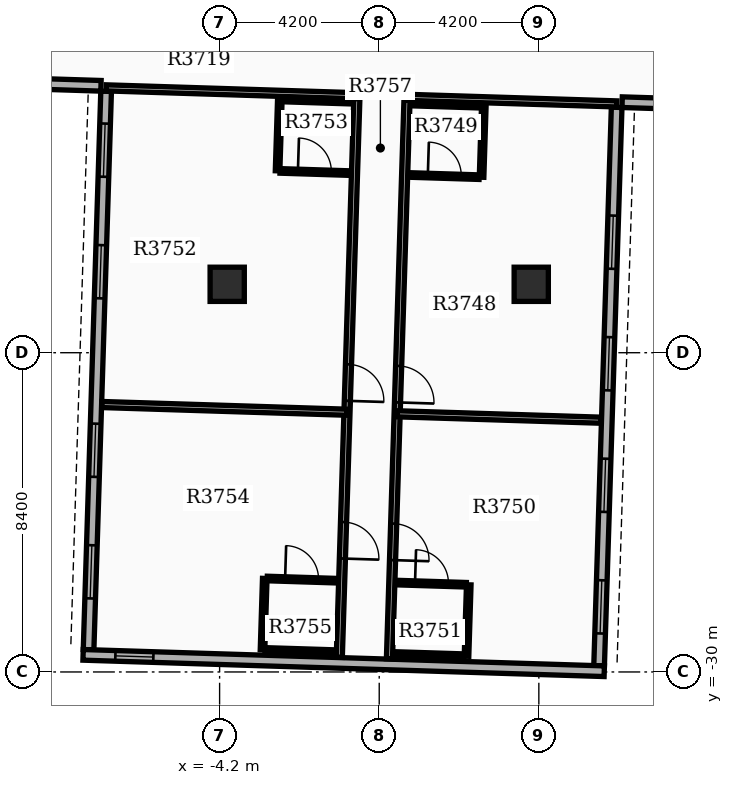
"""IFC4 building model, lengths in metres.
Left out: names, types, materials, properties, quantities, classifications, styles, units other than length and angle.
Written with IfcOpenShell. Run it as: python <this file> out.ifc"""

import sys

from ifc_helpers import new_model, si_unit, direction, frame, frame_2d, origin, origin_2d, place, context, subcontext, project, spatial, rectangle, extrude, element, fill, save


model = new_model("IFC4")
c1 = context("Model", 3, precision=1e-05, world=origin(), true_north=direction((0.0, 1.0)))
c2 = subcontext(c1, "Body", "Model", "MODEL_VIEW")
j1 = project(units=[si_unit("LENGTHUNIT", "METRE"), si_unit("PLANEANGLEUNIT", "RADIAN")], contexts=[c1])
p1 = place(None, origin())
s1 = spatial("IfcSite", under=j1, at=p1, CompositionType="ELEMENT")
p2 = place(p1, origin())
s2 = spatial("IfcBuilding", under=s1, at=p2, CompositionType="ELEMENT")
p3 = place(p2, frame((0.0, 0.0, 232.5)))
s3 = spatial("IfcBuildingStorey", under=s2, at=p3, CompositionType="ELEMENT", Elevation=232.5)
for number, where, z_axis, x_axis in (
    (1, (-4.0, -19.8, 0.0), (0.0, 0.0, 1.0), (1.0, 0.0, 0.0)),
    (2, (4.0, -19.8, 0.0), (0.0, 0.0, 1.0), (1.0, 0.0, 0.0)),
):
    element("IfcColumn", number, at=place(p3, frame(where, z_axis=z_axis, x_axis=x_axis)), inside=s3, PredefinedType="COLUMN", context=c2, shape_type="SweptSolid", body=[
        extrude(rectangle(XDim=0.9, YDim=0.9, at=origin_2d()), origin(), (0.0, 0.0, 1.0), 3.9),
    ])
p4 = place(p3, frame((-7.186, -14.721, 0.0), z_axis=(0.0, 0.0, 1.0), x_axis=(-0.031405855522, -0.999506714454, 0.0)))
e3 = element("IfcWall", 3, at=p4, inside=s3, PredefinedType="STANDARD", context=c2, shape_type="SweptSolid", body=[
    extrude(rectangle(XDim=14.7, YDim=0.28, at=frame_2d((7.35, 0.0))), origin(), (0.0, 0.0, 1.0), 3.18),
])
p5 = place(p4, frame((0.85, 0.0, 0.8)))
e4 = element("IfcOpeningElement", 4, at=p5, cuts=e3, PredefinedType="OPENING", context=c2, shape_type="SweptSolid", body=[
    extrude(rectangle(XDim=1.4, YDim=1.6, at=frame_2d((0.7, 0.8))), frame((0.0, 0.15, 0.0), z_axis=(0.0, -1.0, 0.0), x_axis=(1.0, 0.0, 0.0)), (0.0, 0.0, 1.0), 0.3),
])
p6 = place(p4, frame((4.05, 0.0, 0.8)))
e5 = element("IfcOpeningElement", 5, at=p6, cuts=e3, PredefinedType="OPENING", context=c2, shape_type="SweptSolid", body=[
    extrude(rectangle(XDim=1.4, YDim=1.6, at=frame_2d((0.7, 0.8))), frame((0.0, 0.15, 0.0), z_axis=(0.0, -1.0, 0.0), x_axis=(1.0, 0.0, 0.0)), (0.0, 0.0, 1.0), 0.3),
])
p7 = place(p4, frame((8.75, 0.0, 0.8)))
e6 = element("IfcOpeningElement", 6, at=p7, cuts=e3, PredefinedType="OPENING", context=c2, shape_type="SweptSolid", body=[
    extrude(rectangle(XDim=1.4, YDim=1.6, at=frame_2d((0.7, 0.8))), frame((0.0, 0.15, 0.0), z_axis=(0.0, -1.0, 0.0), x_axis=(1.0, 0.0, 0.0)), (0.0, 0.0, 1.0), 0.3),
])
p8 = place(p4, frame((11.95, 0.0, 0.8)))
e7 = element("IfcOpeningElement", 7, at=p8, cuts=e3, PredefinedType="OPENING", context=c2, shape_type="SweptSolid", body=[
    extrude(rectangle(XDim=1.4, YDim=1.6, at=frame_2d((0.7, 0.8))), frame((0.0, 0.15, 0.0), z_axis=(0.0, -1.0, 0.0), x_axis=(1.0, 0.0, 0.0)), (0.0, 0.0, 1.0), 0.3),
])
p9 = place(p3, frame((5.786, -29.836, 0.0), z_axis=(0.0, 0.0, 1.0), x_axis=(0.031406376864, 0.999506698073, 0.0)))
e8 = element("IfcWall", 8, at=p9, inside=s3, PredefinedType="STANDARD", context=c2, shape_type="SweptSolid", body=[
    extrude(rectangle(XDim=14.7, YDim=0.28, at=frame_2d((7.35, 0.0))), origin(), (0.0, 0.0, 1.0), 3.18),
])
p10 = place(p9, frame((0.85, 0.0, 0.8)))
e9 = element("IfcOpeningElement", 9, at=p10, cuts=e8, PredefinedType="OPENING", context=c2, shape_type="SweptSolid", body=[
    extrude(rectangle(XDim=1.4, YDim=1.6, at=frame_2d((0.7, 0.8))), frame((0.0, 0.15, 0.0), z_axis=(0.0, -1.0, 0.0), x_axis=(1.0, 0.0, 0.0)), (0.0, 0.0, 1.0), 0.3),
])
p11 = place(p9, frame((4.05, 0.0, 0.8)))
e10 = element("IfcOpeningElement", 10, at=p11, cuts=e8, PredefinedType="OPENING", context=c2, shape_type="SweptSolid", body=[
    extrude(rectangle(XDim=1.4, YDim=1.6, at=frame_2d((0.7, 0.8))), frame((0.0, 0.15, 0.0), z_axis=(0.0, -1.0, 0.0), x_axis=(1.0, 0.0, 0.0)), (0.0, 0.0, 1.0), 0.3),
])
p12 = place(p9, frame((7.25, 0.0, 0.8)))
e11 = element("IfcOpeningElement", 11, at=p12, cuts=e8, PredefinedType="OPENING", context=c2, shape_type="SweptSolid", body=[
    extrude(rectangle(XDim=1.4, YDim=1.6, at=frame_2d((0.7, 0.8))), frame((0.0, 0.15, 0.0), z_axis=(0.0, -1.0, 0.0), x_axis=(1.0, 0.0, 0.0)), (0.0, 0.0, 1.0), 0.3),
])
p13 = place(p9, frame((10.45, 0.0, 0.8)))
e12 = element("IfcOpeningElement", 12, at=p13, cuts=e8, PredefinedType="OPENING", context=c2, shape_type="SweptSolid", body=[
    extrude(rectangle(XDim=1.4, YDim=1.6, at=frame_2d((0.7, 0.8))), frame((0.0, 0.15, 0.0), z_axis=(0.0, -1.0, 0.0), x_axis=(1.0, 0.0, 0.0)), (0.0, 0.0, 1.0), 0.3),
])
p14 = place(p3, frame((-7.792, -29.55, 0.0), z_axis=(0.0, 0.0, 1.0), x_axis=(0.999506662003, -0.031407524763, 0.0)))
e13 = element("IfcWall", 13, at=p14, inside=s3, PredefinedType="STANDARD", context=c2, shape_type="SweptSolid", body=[
    extrude(rectangle(XDim=13.72, YDim=0.28, at=frame_2d((6.86, 0.0))), origin(), (0.0, 0.0, 1.0), 3.18),
])
p15 = place(p14, frame((0.85, 0.0, 0.85)))
e14 = element("IfcOpeningElement", 14, at=p15, cuts=e13, PredefinedType="OPENING", context=c2, shape_type="SweptSolid", body=[
    extrude(rectangle(XDim=1.0, YDim=1.5, at=frame_2d((0.5, 0.75))), frame((0.0, 0.15, 0.0), z_axis=(0.0, -1.0, 0.0), x_axis=(1.0, 0.0, 0.0)), (0.0, 0.0, 1.0), 0.3),
])
p16 = place(p3, frame((-13.618, -14.379, 0.0), z_axis=(0.0, 0.0, 1.0), x_axis=(0.999507224741, -0.031389611199, 0.0)))
e15 = element("IfcWall", 15, at=p16, inside=s3, PredefinedType="STANDARD", context=c2, shape_type="SweptSolid", body=[
    extrude(rectangle(XDim=6.3, YDim=0.28, at=frame_2d((3.15, 0.0))), origin(), (0.0, 0.0, 1.0), 3.18),
])
p17 = place(p3, frame((12.689, -15.206, 0.0), z_axis=(0.0, 0.0, 1.0), x_axis=(-0.999507262922, 0.031388395416, 0.0)))
e16 = element("IfcWall", 16, at=p17, inside=s3, PredefinedType="STANDARD", context=c2, shape_type="SweptSolid", body=[
    extrude(rectangle(XDim=6.3, YDim=0.28, at=frame_2d((3.15, 0.0))), origin(), (0.0, 0.0, 1.0), 3.18),
])
p18 = place(p3, frame((0.733, -14.88, 0.0), z_axis=(0.0, 0.0, 1.0), x_axis=(-0.031413673903, -0.999506468759, 0.0)))
e17 = element("IfcWall", 17, at=p18, inside=s3, PredefinedType="PARTITIONING", context=c2, shape_type="SweptSolid", body=[
    extrude(rectangle(XDim=14.782, YDim=0.16, at=frame_2d((7.391, 0.0))), origin(), (0.0, 0.0, 1.0), 3.17),
])
p19 = place(p18, frame((7.071, 0.0, 0.0)))
e18 = element("IfcOpeningElement", 18, at=p19, cuts=e17, PredefinedType="OPENING", context=c2, shape_type="SweptSolid", body=[
    extrude(rectangle(XDim=0.96, YDim=2.15, at=frame_2d((0.48, 1.075))), frame((0.0, 0.09, 0.0), z_axis=(0.0, -1.0, 0.0), x_axis=(1.0, 0.0, 0.0)), (0.0, 0.0, 1.0), 0.18),
])
p20 = place(p18, frame((11.222, 0.0, 0.0)))
e19 = element("IfcOpeningElement", 19, at=p20, cuts=e17, PredefinedType="OPENING", context=c2, shape_type="SweptSolid", body=[
    extrude(rectangle(XDim=0.96, YDim=2.15, at=frame_2d((0.48, 1.075))), frame((0.0, 0.09, 0.0), z_axis=(0.0, -1.0, 0.0), x_axis=(1.0, 0.0, 0.0)), (0.0, 0.0, 1.0), 0.18),
])
p21 = place(p3, frame((0.733, -14.88, 0.0), z_axis=(0.0, 0.0, 1.0), x_axis=(0.999506841071, -0.031401825619, 0.0)))
e20 = element("IfcWall", 20, at=p21, inside=s3, PredefinedType="PARTITIONING", context=c2, shape_type="SweptSolid", body=[
    extrude(rectangle(XDim=5.52, YDim=0.16, at=frame_2d((2.76, 0.0))), origin(), (0.0, 0.0, 1.0), 3.17),
])
p22 = place(p3, frame((0.471, -23.207, 0.0), z_axis=(0.0, 0.0, 1.0), x_axis=(0.999506785589, -0.031403591545, 0.0)))
e21 = element("IfcWall", 21, at=p22, inside=s3, PredefinedType="PARTITIONING", context=c2, shape_type="SweptSolid", body=[
    extrude(rectangle(XDim=5.372, YDim=0.16, at=frame_2d((2.686, 0.0))), origin(), (0.0, 0.0, 1.0), 3.17),
])
p23 = place(p3, frame((0.809, -16.924, 0.0), z_axis=(0.0, 0.0, 1.0), x_axis=(0.999507221803, -0.031389704724, 0.0)))
e22 = element("IfcWall", 22, at=p23, inside=s3, PredefinedType="PARTITIONING", context=c2, shape_type="SweptSolid", body=[
    extrude(rectangle(XDim=1.82, YDim=0.12, at=frame_2d((0.91, 0.0))), origin(), (0.0, 0.0, 1.0), 3.17),
])
p24 = place(p23, frame((0.47, 0.0, 0.0)))
e23 = element("IfcOpeningElement", 23, at=p24, cuts=e22, PredefinedType="OPENING", context=c2, shape_type="SweptSolid", body=[
    extrude(rectangle(XDim=0.88, YDim=2.1, at=frame_2d((0.44, 1.05))), frame((0.0, 0.07, 0.0), z_axis=(0.0, -1.0, 0.0), x_axis=(1.0, 0.0, 0.0)), (0.0, 0.0, 1.0), 0.14),
])
p25 = place(p3, frame((0.868, -15.045, 0.0), z_axis=(0.0, 0.0, 1.0), x_axis=(0.999507221803, -0.031389704724, 0.0)))
e24 = element("IfcWall", 24, at=p25, inside=s3, PredefinedType="PARTITIONING", context=c2, shape_type="SweptSolid", body=[
    extrude(rectangle(XDim=1.82, YDim=0.12, at=frame_2d((0.91, 0.0))), origin(), (0.0, 0.0, 1.0), 3.17),
])
p26 = place(p3, frame((2.752, -15.104, 0.0), z_axis=(0.0, 0.0, 1.0), x_axis=(-0.031429371883, -0.999505975261, 0.0)))
e25 = element("IfcWall", 25, at=p26, inside=s3, PredefinedType="PARTITIONING", context=c2, shape_type="SweptSolid", body=[
    extrude(rectangle(XDim=1.88, YDim=0.12, at=frame_2d((0.94, 0.0))), origin(), (0.0, 0.0, 1.0), 3.17),
])
p27 = place(p3, frame((0.472, -27.648, 0.0), z_axis=(0.0, 0.0, 1.0), x_axis=(0.999507353951, -0.031385496622, 0.0)))
e26 = element("IfcWall", 26, at=p27, inside=s3, PredefinedType="PARTITIONING", context=c2, shape_type="SweptSolid", body=[
    extrude(rectangle(XDim=1.82, YDim=0.12, at=frame_2d((0.91, 0.0))), origin(), (0.0, 0.0, 1.0), 3.17),
])
p28 = place(p27, frame((0.47, 0.0, 0.0)))
e27 = element("IfcOpeningElement", 27, at=p28, cuts=e26, PredefinedType="OPENING", context=c2, shape_type="SweptSolid", body=[
    extrude(rectangle(XDim=0.88, YDim=2.1, at=frame_2d((0.44, 1.05))), frame((0.0, 0.07, 0.0), z_axis=(0.0, -1.0, 0.0), x_axis=(1.0, 0.0, 0.0)), (0.0, 0.0, 1.0), 0.14),
])
p29 = place(p3, frame((0.413, -29.528, 0.0), z_axis=(0.0, 0.0, 1.0), x_axis=(0.999507221803, -0.031389704724, 0.0)))
e28 = element("IfcWall", 28, at=p29, inside=s3, PredefinedType="PARTITIONING", context=c2, shape_type="SweptSolid", body=[
    extrude(rectangle(XDim=1.82, YDim=0.12, at=frame_2d((0.91, 0.0))), origin(), (0.0, 0.0, 1.0), 3.17),
])
p30 = place(p3, frame((2.356, -27.708, 0.0), z_axis=(0.0, 0.0, 1.0), x_axis=(-0.031299625942, -0.999510046681, 0.0)))
e29 = element("IfcWall", 29, at=p30, inside=s3, PredefinedType="PARTITIONING", context=c2, shape_type="SweptSolid", body=[
    extrude(rectangle(XDim=1.88, YDim=0.12, at=frame_2d((0.94, 0.0))), origin(), (0.0, 0.0, 1.0), 3.17),
])
p31 = place(p3, frame((-0.586, -14.839, 0.0), z_axis=(0.0, 0.0, 1.0), x_axis=(-0.031413673903, -0.999506468759, 0.0)))
e30 = element("IfcWall", 30, at=p31, inside=s3, PredefinedType="PARTITIONING", context=c2, shape_type="SweptSolid", body=[
    extrude(rectangle(XDim=14.782, YDim=0.16, at=frame_2d((7.391, 0.0))), origin(), (0.0, 0.0, 1.0), 3.17),
])
p32 = place(p31, frame((7.071, 0.0, 0.0)))
e31 = element("IfcOpeningElement", 31, at=p32, cuts=e30, PredefinedType="OPENING", context=c2, shape_type="SweptSolid", body=[
    extrude(rectangle(XDim=0.96, YDim=2.15, at=frame_2d((0.48, 1.075))), frame((0.0, 0.09, 0.0), z_axis=(0.0, -1.0, 0.0), x_axis=(1.0, 0.0, 0.0)), (0.0, 0.0, 1.0), 0.18),
])
p33 = place(p31, frame((11.222, 0.0, 0.0)))
e32 = element("IfcOpeningElement", 32, at=p33, cuts=e30, PredefinedType="OPENING", context=c2, shape_type="SweptSolid", body=[
    extrude(rectangle(XDim=0.96, YDim=2.15, at=frame_2d((0.48, 1.075))), frame((0.0, 0.09, 0.0), z_axis=(0.0, -1.0, 0.0), x_axis=(1.0, 0.0, 0.0)), (0.0, 0.0, 1.0), 0.18),
])
p34 = place(p3, frame((-0.586, -14.839, 0.0), z_axis=(0.0, 0.0, 1.0), x_axis=(-0.999506720281, 0.031405670078, 0.0)))
e33 = element("IfcWall", 33, at=p34, inside=s3, PredefinedType="PARTITIONING", context=c2, shape_type="SweptSolid", body=[
    extrude(rectangle(XDim=6.6, YDim=0.16, at=frame_2d((3.3, 0.0))), origin(), (0.0, 0.0, 1.0), 3.17),
])
p35 = place(p3, frame((-0.848, -23.166, 0.0), z_axis=(0.0, 0.0, 1.0), x_axis=(-0.999506671308, 0.031407228636, 0.0)))
e34 = element("IfcWall", 34, at=p35, inside=s3, PredefinedType="PARTITIONING", context=c2, shape_type="SweptSolid", body=[
    extrude(rectangle(XDim=6.452, YDim=0.16, at=frame_2d((3.226, 0.0))), origin(), (0.0, 0.0, 1.0), 3.17),
])
p36 = place(p3, frame((-2.61, -16.816, 0.0), z_axis=(0.0, 0.0, 1.0), x_axis=(0.999507353951, -0.031385496622, 0.0)))
e35 = element("IfcWall", 35, at=p36, inside=s3, PredefinedType="PARTITIONING", context=c2, shape_type="SweptSolid", body=[
    extrude(rectangle(XDim=1.82, YDim=0.12, at=frame_2d((0.91, 0.0))), origin(), (0.0, 0.0, 1.0), 3.17),
])
p37 = place(p36, frame((0.47, 0.0, 0.0)))
e36 = element("IfcOpeningElement", 36, at=p37, cuts=e35, PredefinedType="OPENING", context=c2, shape_type="SweptSolid", body=[
    extrude(rectangle(XDim=0.88, YDim=2.1, at=frame_2d((0.44, 1.05))), frame((0.0, 0.07, 0.0), z_axis=(0.0, -1.0, 0.0), x_axis=(1.0, 0.0, 0.0)), (0.0, 0.0, 1.0), 0.14),
])
p38 = place(p3, frame((-2.55, -14.937, 0.0), z_axis=(0.0, 0.0, 1.0), x_axis=(0.999507221803, -0.031389704724, 0.0)))
e37 = element("IfcWall", 37, at=p38, inside=s3, PredefinedType="PARTITIONING", context=c2, shape_type="SweptSolid", body=[
    extrude(rectangle(XDim=1.82, YDim=0.12, at=frame_2d((0.91, 0.0))), origin(), (0.0, 0.0, 1.0), 3.17),
])
p39 = place(p3, frame((-2.615, -14.935, 0.0), z_axis=(0.0, 0.0, 1.0), x_axis=(-0.031429371883, -0.999505975261, 0.0)))
e38 = element("IfcWall", 38, at=p39, inside=s3, PredefinedType="PARTITIONING", context=c2, shape_type="SweptSolid", body=[
    extrude(rectangle(XDim=1.88, YDim=0.12, at=frame_2d((0.94, 0.0))), origin(), (0.0, 0.0, 1.0), 3.17),
])
p40 = place(p3, frame((-2.947, -27.541, 0.0), z_axis=(0.0, 0.0, 1.0), x_axis=(0.999507221803, -0.031389704724, 0.0)))
e39 = element("IfcWall", 39, at=p40, inside=s3, PredefinedType="PARTITIONING", context=c2, shape_type="SweptSolid", body=[
    extrude(rectangle(XDim=1.82, YDim=0.12, at=frame_2d((0.91, 0.0))), origin(), (0.0, 0.0, 1.0), 3.17),
])
p41 = place(p40, frame((0.47, 0.0, 0.0)))
e40 = element("IfcOpeningElement", 40, at=p41, cuts=e39, PredefinedType="OPENING", context=c2, shape_type="SweptSolid", body=[
    extrude(rectangle(XDim=0.88, YDim=2.1, at=frame_2d((0.44, 1.05))), frame((0.0, 0.07, 0.0), z_axis=(0.0, -1.0, 0.0), x_axis=(1.0, 0.0, 0.0)), (0.0, 0.0, 1.0), 0.14),
])
p42 = place(p3, frame((-3.006, -29.42, 0.0), z_axis=(0.0, 0.0, 1.0), x_axis=(0.999507221803, -0.031389704724, 0.0)))
e41 = element("IfcWall", 41, at=p42, inside=s3, PredefinedType="PARTITIONING", context=c2, shape_type="SweptSolid", body=[
    extrude(rectangle(XDim=1.82, YDim=0.12, at=frame_2d((0.91, 0.0))), origin(), (0.0, 0.0, 1.0), 3.17),
])
p43 = place(p3, frame((-3.011, -27.539, 0.0), z_axis=(0.0, 0.0, 1.0), x_axis=(-0.031425292588, -0.999506103526, 0.0)))
e42 = element("IfcWall", 42, at=p43, inside=s3, PredefinedType="PARTITIONING", context=c2, shape_type="SweptSolid", body=[
    extrude(rectangle(XDim=1.88, YDim=0.12, at=frame_2d((0.94, 0.0))), origin(), (0.0, 0.0, 1.0), 3.17),
])
p44 = place(p5, origin())
e43 = element("IfcWindow", 43, at=p44, inside=s3, PartitioningType="SINGLE_PANEL", PredefinedType="WINDOW", context=c2, shape_type="SweptSolid", body=[
    extrude(rectangle(XDim=1.4, YDim=1.6, at=frame_2d((0.7, 0.8))), frame((0.0, 0.03, 0.0), z_axis=(0.0, -1.0, 0.0), x_axis=(1.0, 0.0, 0.0)), (0.0, 0.0, 1.0), 0.06),
])
fill(e4, e43)
p45 = place(p6, origin())
e44 = element("IfcWindow", 44, at=p45, inside=s3, PartitioningType="SINGLE_PANEL", PredefinedType="WINDOW", context=c2, shape_type="SweptSolid", body=[
    extrude(rectangle(XDim=1.4, YDim=1.6, at=frame_2d((0.7, 0.8))), frame((0.0, 0.03, 0.0), z_axis=(0.0, -1.0, 0.0), x_axis=(1.0, 0.0, 0.0)), (0.0, 0.0, 1.0), 0.06),
])
fill(e5, e44)
p46 = place(p7, origin())
e45 = element("IfcWindow", 45, at=p46, inside=s3, PartitioningType="SINGLE_PANEL", PredefinedType="WINDOW", context=c2, shape_type="SweptSolid", body=[
    extrude(rectangle(XDim=1.4, YDim=1.6, at=frame_2d((0.7, 0.8))), frame((0.0, 0.03, 0.0), z_axis=(0.0, -1.0, 0.0), x_axis=(1.0, 0.0, 0.0)), (0.0, 0.0, 1.0), 0.06),
])
fill(e6, e45)
p47 = place(p8, origin())
e46 = element("IfcWindow", 46, at=p47, inside=s3, PartitioningType="SINGLE_PANEL", PredefinedType="WINDOW", context=c2, shape_type="SweptSolid", body=[
    extrude(rectangle(XDim=1.4, YDim=1.6, at=frame_2d((0.7, 0.8))), frame((0.0, 0.03, 0.0), z_axis=(0.0, -1.0, 0.0), x_axis=(1.0, 0.0, 0.0)), (0.0, 0.0, 1.0), 0.06),
])
fill(e7, e46)
p48 = place(p10, origin())
e47 = element("IfcWindow", 47, at=p48, inside=s3, PartitioningType="SINGLE_PANEL", PredefinedType="WINDOW", context=c2, shape_type="SweptSolid", body=[
    extrude(rectangle(XDim=1.4, YDim=1.6, at=frame_2d((0.7, 0.8))), frame((0.0, 0.03, 0.0), z_axis=(0.0, -1.0, 0.0), x_axis=(1.0, 0.0, 0.0)), (0.0, 0.0, 1.0), 0.06),
])
fill(e9, e47)
p49 = place(p11, origin())
e48 = element("IfcWindow", 48, at=p49, inside=s3, PartitioningType="SINGLE_PANEL", PredefinedType="WINDOW", context=c2, shape_type="SweptSolid", body=[
    extrude(rectangle(XDim=1.4, YDim=1.6, at=frame_2d((0.7, 0.8))), frame((0.0, 0.03, 0.0), z_axis=(0.0, -1.0, 0.0), x_axis=(1.0, 0.0, 0.0)), (0.0, 0.0, 1.0), 0.06),
])
fill(e10, e48)
p50 = place(p12, origin())
e49 = element("IfcWindow", 49, at=p50, inside=s3, PartitioningType="SINGLE_PANEL", PredefinedType="WINDOW", context=c2, shape_type="SweptSolid", body=[
    extrude(rectangle(XDim=1.4, YDim=1.6, at=frame_2d((0.7, 0.8))), frame((0.0, 0.03, 0.0), z_axis=(0.0, -1.0, 0.0), x_axis=(1.0, 0.0, 0.0)), (0.0, 0.0, 1.0), 0.06),
])
fill(e11, e49)
p51 = place(p13, origin())
e50 = element("IfcWindow", 50, at=p51, inside=s3, PartitioningType="SINGLE_PANEL", PredefinedType="WINDOW", context=c2, shape_type="SweptSolid", body=[
    extrude(rectangle(XDim=1.4, YDim=1.6, at=frame_2d((0.7, 0.8))), frame((0.0, 0.03, 0.0), z_axis=(0.0, -1.0, 0.0), x_axis=(1.0, 0.0, 0.0)), (0.0, 0.0, 1.0), 0.06),
])
fill(e12, e50)
p52 = place(p15, origin())
e51 = element("IfcWindow", 51, at=p52, inside=s3, PartitioningType="SINGLE_PANEL", PredefinedType="WINDOW", context=c2, shape_type="SweptSolid", body=[
    extrude(rectangle(XDim=1.0, YDim=1.5, at=frame_2d((0.5, 0.75))), frame((0.0, 0.03, 0.0), z_axis=(0.0, -1.0, 0.0), x_axis=(1.0, 0.0, 0.0)), (0.0, 0.0, 1.0), 0.06),
])
fill(e14, e51)
p53 = place(p19, origin())
e52 = element("IfcDoor", 52, at=p53, inside=s3, OperationType="SINGLE_SWING_RIGHT", PredefinedType="DOOR", context=c2, shape_type="SweptSolid", body=[
    extrude(rectangle(XDim=0.96, YDim=2.15, at=frame_2d((0.48, 1.075))), frame((0.0, 0.025, 0.0), z_axis=(0.0, -1.0, 0.0), x_axis=(1.0, 0.0, 0.0)), (0.0, 0.0, 1.0), 0.05),
])
fill(e18, e52)
p54 = place(p24, origin())
e53 = element("IfcDoor", 53, at=p54, inside=s3, OperationType="SINGLE_SWING_LEFT", PredefinedType="DOOR", context=c2, shape_type="SweptSolid", body=[
    extrude(rectangle(XDim=0.88, YDim=2.1, at=frame_2d((0.44, 1.05))), frame((0.0, 0.025, 0.0), z_axis=(0.0, -1.0, 0.0), x_axis=(1.0, 0.0, 0.0)), (0.0, 0.0, 1.0), 0.05),
])
fill(e23, e53)
p55 = place(p20, origin())
e54 = element("IfcDoor", 54, at=p55, inside=s3, OperationType="SINGLE_SWING_RIGHT", PredefinedType="DOOR", context=c2, shape_type="SweptSolid", body=[
    extrude(rectangle(XDim=0.96, YDim=2.15, at=frame_2d((0.48, 1.075))), frame((0.0, 0.025, 0.0), z_axis=(0.0, -1.0, 0.0), x_axis=(1.0, 0.0, 0.0)), (0.0, 0.0, 1.0), 0.05),
])
fill(e19, e54)
p56 = place(p28, origin())
e55 = element("IfcDoor", 55, at=p56, inside=s3, OperationType="SINGLE_SWING_LEFT", PredefinedType="DOOR", context=c2, shape_type="SweptSolid", body=[
    extrude(rectangle(XDim=0.88, YDim=2.1, at=frame_2d((0.44, 1.05))), frame((0.0, 0.025, 0.0), z_axis=(0.0, -1.0, 0.0), x_axis=(1.0, 0.0, 0.0)), (0.0, 0.0, 1.0), 0.05),
])
fill(e27, e55)
p57 = place(p32, origin())
e56 = element("IfcDoor", 56, at=p57, inside=s3, OperationType="SINGLE_SWING_RIGHT", PredefinedType="DOOR", context=c2, shape_type="SweptSolid", body=[
    extrude(rectangle(XDim=0.96, YDim=2.15, at=frame_2d((0.48, 1.075))), frame((0.0, 0.025, 0.0), z_axis=(0.0, -1.0, 0.0), x_axis=(1.0, 0.0, 0.0)), (0.0, 0.0, 1.0), 0.05),
])
fill(e31, e56)
p58 = place(p37, origin())
e57 = element("IfcDoor", 57, at=p58, inside=s3, OperationType="SINGLE_SWING_LEFT", PredefinedType="DOOR", context=c2, shape_type="SweptSolid", body=[
    extrude(rectangle(XDim=0.88, YDim=2.1, at=frame_2d((0.44, 1.05))), frame((0.0, 0.025, 0.0), z_axis=(0.0, -1.0, 0.0), x_axis=(1.0, 0.0, 0.0)), (0.0, 0.0, 1.0), 0.05),
])
fill(e36, e57)
p59 = place(p33, origin())
e58 = element("IfcDoor", 58, at=p59, inside=s3, OperationType="SINGLE_SWING_RIGHT", PredefinedType="DOOR", context=c2, shape_type="SweptSolid", body=[
    extrude(rectangle(XDim=0.96, YDim=2.15, at=frame_2d((0.48, 1.075))), frame((0.0, 0.025, 0.0), z_axis=(0.0, -1.0, 0.0), x_axis=(1.0, 0.0, 0.0)), (0.0, 0.0, 1.0), 0.05),
])
fill(e32, e58)
p60 = place(p41, origin())
e59 = element("IfcDoor", 59, at=p60, inside=s3, OperationType="SINGLE_SWING_LEFT", PredefinedType="DOOR", context=c2, shape_type="SweptSolid", body=[
    extrude(rectangle(XDim=0.88, YDim=2.1, at=frame_2d((0.44, 1.05))), frame((0.0, 0.025, 0.0), z_axis=(0.0, -1.0, 0.0), x_axis=(1.0, 0.0, 0.0)), (0.0, 0.0, 1.0), 0.05),
])
fill(e40, e59)
save(model, sys.argv[1])
